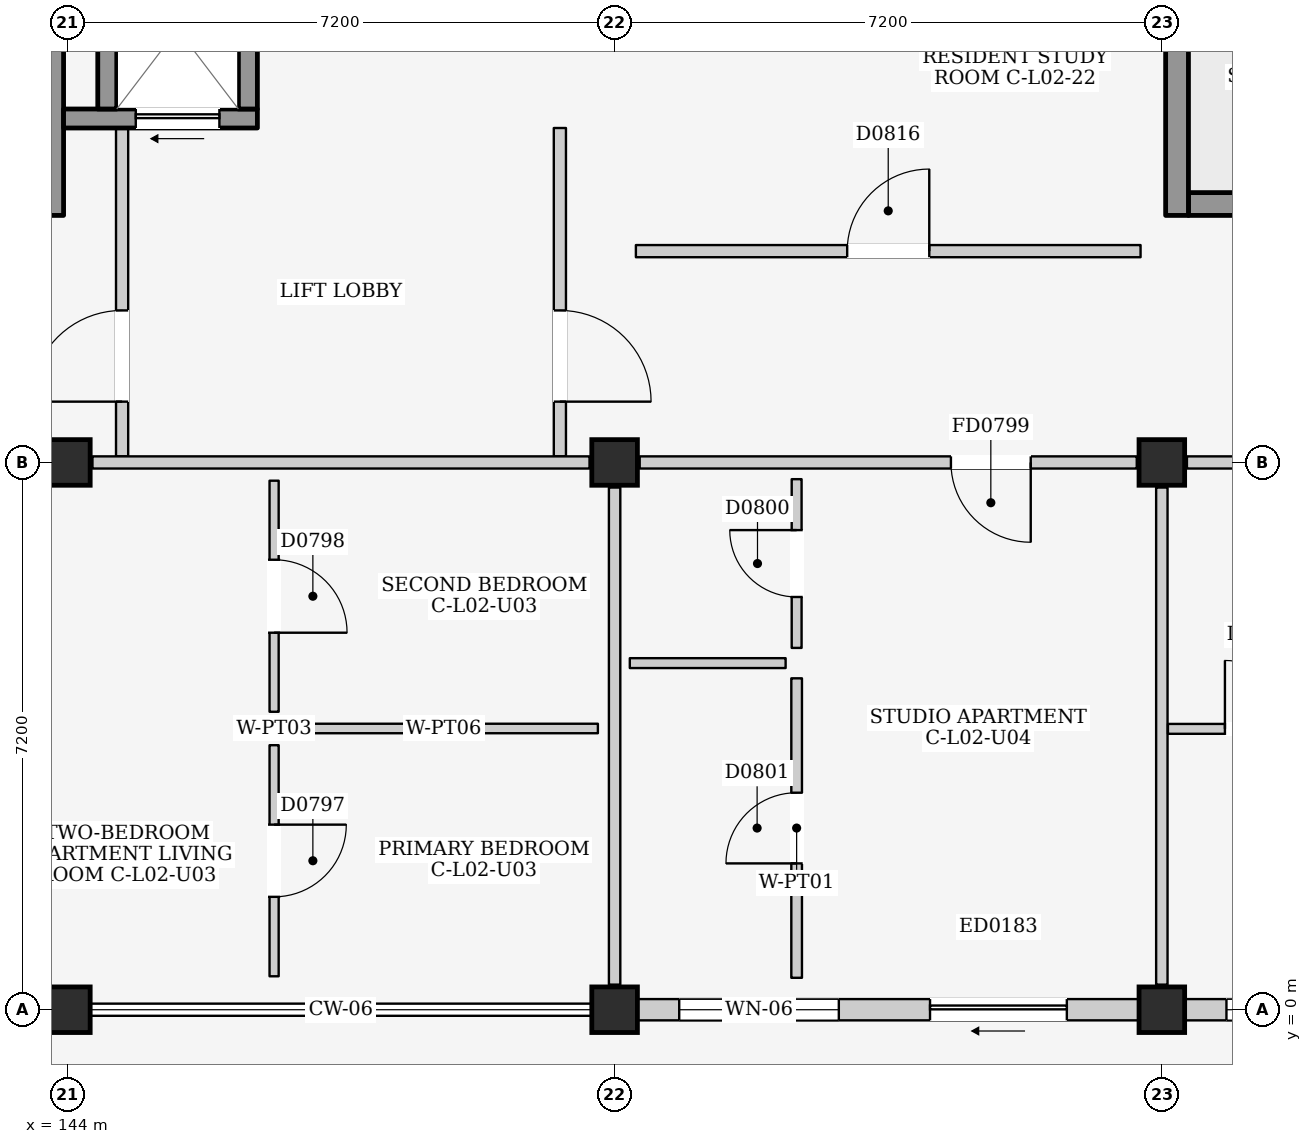
"""IFC4 building model, lengths in metres.
Left out: names, types, materials, properties, quantities, classifications, styles, units other than length and angle.
Written with IfcOpenShell. Run it as: python <this file> out.ifc"""

import sys

from ifc_helpers import new_model, si_unit, direction, frame, frame_2d, origin, origin_2d, place, context, subcontext, project, spatial, rectangle, extrude, element, fill, save


model = new_model("IFC4")
c1 = context("Model", 3, precision=1e-05, world=origin(), true_north=direction((0.0, 1.0)))
c2 = subcontext(c1, "Body", "Model", "MODEL_VIEW")
j1 = project(units=[si_unit("LENGTHUNIT", "METRE"), si_unit("PLANEANGLEUNIT", "RADIAN")], contexts=[c1])
p1 = place(None, origin())
s1 = spatial("IfcSite", under=j1, at=p1, CompositionType="ELEMENT")
p2 = place(p1, origin())
s2 = spatial("IfcBuilding", under=s1, at=p2, CompositionType="ELEMENT")
p3 = place(p2, frame((0.0, 0.0, 9.0)))
s3 = spatial("IfcBuildingStorey", under=s2, at=p3, CompositionType="ELEMENT", Elevation=9.0)
for number, where, z_axis, x_axis in (
    (1, (144.0, 0.0, 0.0), (0.0, 0.0, 1.0), (1.0, 0.0, 0.0)),
    (2, (144.0, 7.2, 0.0), (0.0, 0.0, 1.0), (1.0, 0.0, 0.0)),
    (3, (151.2, 0.0, 0.0), (0.0, 0.0, 1.0), (1.0, 0.0, 0.0)),
    (4, (151.2, 7.2, 0.0), (0.0, 0.0, 1.0), (1.0, 0.0, 0.0)),
    (5, (158.4, 0.0, 0.0), (0.0, 0.0, 1.0), (1.0, 0.0, 0.0)),
    (6, (158.4, 7.2, 0.0), (0.0, 0.0, 1.0), (1.0, 0.0, 0.0)),
):
    element("IfcColumn", number, at=place(p3, frame(where, z_axis=z_axis, x_axis=x_axis)), inside=s3, PredefinedType="COLUMN", context=c2, shape_type="SweptSolid", body=[
        extrude(rectangle(XDim=0.6, YDim=0.6, at=origin_2d()), origin(), (0.0, 0.0, 1.0), 3.2),
    ])
p4 = place(p3, frame((151.5, 0.0, 0.0), z_axis=(0.0, 0.0, 1.0), x_axis=(1.0, 0.0, 0.0)))
e7 = element("IfcWall", 7, at=p4, inside=s3, PredefinedType="ELEMENTEDWALL", context=c2, shape_type="SweptSolid", body=[
    extrude(rectangle(XDim=6.6, YDim=0.28, at=frame_2d((3.3, 0.0))), origin(), (0.0, 0.0, 1.0), 2.425),
])
p5 = place(p4, frame((3.85, 0.0, 0.0)))
e8 = element("IfcOpeningElement", 8, at=p5, cuts=e7, PredefinedType="OPENING", context=c2, shape_type="SweptSolid", body=[
    extrude(rectangle(XDim=1.8, YDim=2.12, at=frame_2d((0.9, 1.06))), frame((0.0, 0.155, 0.0), z_axis=(0.0, -1.0, 0.0), x_axis=(1.0, 0.0, 0.0)), (0.0, 0.0, 1.0), 0.31),
])
p6 = place(p4, frame((0.55, 0.0, 0.665)))
e9 = element("IfcOpeningElement", 9, at=p6, cuts=e7, PredefinedType="OPENING", context=c2, shape_type="SweptSolid", body=[
    extrude(rectangle(XDim=2.1, YDim=1.65, at=frame_2d((1.05, 0.825))), frame((0.0, 0.155, 0.0), z_axis=(0.0, -1.0, 0.0), x_axis=(1.0, 0.0, 0.0)), (0.0, 0.0, 1.0), 0.31),
])
p7 = place(p3, frame((158.7, 0.0, 0.0), z_axis=(0.0, 0.0, 1.0), x_axis=(1.0, 0.0, 0.0)))
e10 = element("IfcWall", 10, at=p7, inside=s3, PredefinedType="ELEMENTEDWALL", context=c2, shape_type="SweptSolid", body=[
    extrude(rectangle(XDim=6.6, YDim=0.28, at=frame_2d((3.3, 0.0))), origin(), (0.0, 0.0, 1.0), 2.425),
])
p8 = place(p7, frame((3.85, 0.0, 0.0)))
e11 = element("IfcOpeningElement", 11, at=p8, cuts=e10, PredefinedType="OPENING", context=c2, shape_type="SweptSolid", body=[
    extrude(rectangle(XDim=1.6, YDim=2.12, at=frame_2d((0.8, 1.06))), frame((0.0, 0.155, 0.0), z_axis=(0.0, -1.0, 0.0), x_axis=(1.0, 0.0, 0.0)), (0.0, 0.0, 1.0), 0.31),
])
p9 = place(p7, frame((0.55, 0.0, 0.9)))
e12 = element("IfcOpeningElement", 12, at=p9, cuts=e10, PredefinedType="OPENING", context=c2, shape_type="SweptSolid", body=[
    extrude(rectangle(XDim=1.4, YDim=1.2, at=frame_2d((0.7, 0.6))), frame((0.0, 0.155, 0.0), z_axis=(0.0, -1.0, 0.0), x_axis=(1.0, 0.0, 0.0)), (0.0, 0.0, 1.0), 0.31),
])
p10 = place(p3, frame((143.8, 10.45, 0.0), z_axis=(0.0, 0.0, 1.0), x_axis=(0.0, 1.0, 0.0)))
e13 = element("IfcWall", 13, at=p10, inside=s3, PredefinedType="SHEAR", context=c2, shape_type="SweptSolid", body=[
    extrude(rectangle(XDim=3.75, YDim=0.3, at=frame_2d((1.875, 0.0))), origin(), (0.0, 0.0, 1.0), 2.96),
])
p11 = place(p3, frame((144.72, 7.28, 0.0), z_axis=(0.0, 0.0, 1.0), x_axis=(0.0, 1.0, 0.0)))
e14 = element("IfcWall", 14, at=p11, inside=s3, PredefinedType="PARTITIONING", context=c2, shape_type="SweptSolid", body=[
    extrude(rectangle(XDim=4.32, YDim=0.16, at=frame_2d((2.16, 0.0))), origin(), (0.0, 0.0, 1.0), 2.96),
])
p12 = place(p11, frame((0.72, 0.0, 0.0)))
e15 = element("IfcOpeningElement", 15, at=p12, cuts=e14, PredefinedType="OPENING", context=c2, shape_type="SweptSolid", body=[
    extrude(rectangle(XDim=1.2, YDim=2.2, at=frame_2d((0.6, 1.1))), frame((0.0, 0.095, 0.0), z_axis=(0.0, -1.0, 0.0), x_axis=(1.0, 0.0, 0.0)), (0.0, 0.0, 1.0), 0.19),
])
p13 = place(p3, frame((150.48, 7.28, 0.0), z_axis=(0.0, 0.0, 1.0), x_axis=(0.0, 1.0, 0.0)))
e16 = element("IfcWall", 16, at=p13, inside=s3, PredefinedType="PARTITIONING", context=c2, shape_type="SweptSolid", body=[
    extrude(rectangle(XDim=4.32, YDim=0.16, at=frame_2d((2.16, 0.0))), origin(), (0.0, 0.0, 1.0), 2.96),
])
p14 = place(p13, frame((0.72, 0.0, 0.0)))
e17 = element("IfcOpeningElement", 17, at=p14, cuts=e16, PredefinedType="OPENING", context=c2, shape_type="SweptSolid", body=[
    extrude(rectangle(XDim=1.2, YDim=2.2, at=frame_2d((0.6, 1.1))), frame((0.0, 0.095, 0.0), z_axis=(0.0, -1.0, 0.0), x_axis=(1.0, 0.0, 0.0)), (0.0, 0.0, 1.0), 0.19),
])
p15 = place(p3, frame((143.95, 11.725, 0.0), z_axis=(0.0, 0.0, 1.0), x_axis=(1.0, 0.0, 0.0)))
e18 = element("IfcWall", 18, at=p15, inside=s3, PredefinedType="SHEAR", context=c2, shape_type="SweptSolid", body=[
    extrude(rectangle(XDim=2.55, YDim=0.25, at=frame_2d((1.275, 0.0))), origin(), (0.0, 0.0, 1.0), 2.96),
])
p16 = place(p15, frame((0.95, 0.0, 0.0)))
e19 = element("IfcOpeningElement", 19, at=p16, cuts=e18, PredefinedType="OPENING", context=c2, shape_type="SweptSolid", body=[
    extrude(rectangle(XDim=1.1, YDim=2.15, at=frame_2d((0.55, 1.075))), frame((0.0, 0.14, 0.0), z_axis=(0.0, -1.0, 0.0), x_axis=(1.0, 0.0, 0.0)), (0.0, 0.0, 1.0), 0.28),
])
for number, where, z_axis, x_axis in (
    (20, (144.525, 11.85, 0.0), (0.0, 0.0, 1.0), (0.0, 1.0, 0.0)),
    (21, (146.375, 11.85, 0.0), (0.0, 0.0, 1.0), (0.0, 1.0, 0.0)),
):
    element("IfcWall", number, at=place(p3, frame(where, z_axis=z_axis, x_axis=x_axis)), inside=s3, PredefinedType="SHEAR", context=c2, shape_type="SweptSolid", body=[
        extrude(rectangle(XDim=2.1, YDim=0.25, at=frame_2d((1.05, 0.0))), origin(), (0.0, 0.0, 1.0), 2.96),
    ])
p17 = place(p3, frame((158.75, 10.6, 0.0), z_axis=(0.0, 0.0, 1.0), x_axis=(1.0, 0.0, 0.0)))
e22 = element("IfcWall", 22, at=p17, inside=s3, PredefinedType="SHEAR", context=c2, shape_type="SweptSolid", body=[
    extrude(rectangle(XDim=6.5, YDim=0.3, at=frame_2d((3.25, 0.0))), origin(), (0.0, 0.0, 1.0), 2.96),
])
p18 = place(p17, frame((5.17, 0.0, 0.0)))
e23 = element("IfcOpeningElement", 23, at=p18, cuts=e22, PredefinedType="OPENING", context=c2, shape_type="SweptSolid", body=[
    extrude(rectangle(XDim=1.15, YDim=2.2, at=frame_2d((0.575, 1.1))), frame((0.0, 0.165, 0.0), z_axis=(0.0, -1.0, 0.0), x_axis=(1.0, 0.0, 0.0)), (0.0, 0.0, 1.0), 0.33),
])
p19 = place(p3, frame((158.6, 10.45, 0.0), z_axis=(0.0, 0.0, 1.0), x_axis=(0.0, 1.0, 0.0)))
e24 = element("IfcWall", 24, at=p19, inside=s3, PredefinedType="SHEAR", context=c2, shape_type="SweptSolid", body=[
    extrude(rectangle(XDim=3.6, YDim=0.3, at=frame_2d((1.8, 0.0))), origin(), (0.0, 0.0, 1.0), 2.96),
])
p20 = place(p3, frame((144.33, 7.2, 0.0), z_axis=(0.0, 0.0, 1.0), x_axis=(1.0, 0.0, 0.0)))
e25 = element("IfcWall", 25, at=p20, inside=s3, PredefinedType="PARTITIONING", context=c2, shape_type="SweptSolid", body=[
    extrude(rectangle(XDim=6.54, YDim=0.16, at=frame_2d((3.27, 0.0))), origin(), (0.0, 0.0, 1.0), 2.345),
])
p21 = place(p3, frame((151.2, 0.33, 0.0), z_axis=(0.0, 0.0, 1.0), x_axis=(0.0, 1.0, 0.0)))
e26 = element("IfcWall", 26, at=p21, inside=s3, PredefinedType="PARTITIONING", context=c2, shape_type="SweptSolid", body=[
    extrude(rectangle(XDim=6.54, YDim=0.15, at=frame_2d((3.27, 0.0))), origin(), (0.0, 0.0, 1.0), 2.395),
])
p22 = place(p3, frame((146.72, 0.44, 0.0), z_axis=(0.0, 0.0, 1.0), x_axis=(0.0, 1.0, 0.0)))
e27 = element("IfcWall", 27, at=p22, inside=s3, PredefinedType="PARTITIONING", context=c2, shape_type="SweptSolid", body=[
    extrude(rectangle(XDim=3.04, YDim=0.12, at=frame_2d((1.52, 0.0))), origin(), (0.0, 0.0, 1.0), 2.96),
])
p23 = place(p22, frame((1.045, 0.0, 0.0)))
e28 = element("IfcOpeningElement", 28, at=p23, cuts=e27, PredefinedType="OPENING", context=c2, shape_type="SweptSolid", body=[
    extrude(rectangle(XDim=0.95, YDim=2.15, at=frame_2d((0.475, 1.075))), frame((0.0, 0.075, 0.0), z_axis=(0.0, -1.0, 0.0), x_axis=(1.0, 0.0, 0.0)), (0.0, 0.0, 1.0), 0.15),
])
p24 = place(p3, frame((146.92, 3.7, 0.0), z_axis=(0.0, 0.0, 1.0), x_axis=(1.0, 0.0, 0.0)))
e29 = element("IfcWall", 29, at=p24, inside=s3, PredefinedType="PARTITIONING", context=c2, shape_type="SweptSolid", body=[
    extrude(rectangle(XDim=4.06, YDim=0.125, at=frame_2d((2.03, 0.0))), origin(), (0.0, 0.0, 1.0), 2.96),
])
p25 = place(p3, frame((146.72, 3.92, 0.0), z_axis=(0.0, 0.0, 1.0), x_axis=(0.0, 1.0, 0.0)))
e30 = element("IfcWall", 30, at=p25, inside=s3, PredefinedType="PARTITIONING", context=c2, shape_type="SweptSolid", body=[
    extrude(rectangle(XDim=3.04, YDim=0.12, at=frame_2d((1.52, 0.0))), origin(), (0.0, 0.0, 1.0), 2.96),
])
p26 = place(p25, frame((1.04, 0.0, 0.0)))
e31 = element("IfcOpeningElement", 31, at=p26, cuts=e30, PredefinedType="OPENING", context=c2, shape_type="SweptSolid", body=[
    extrude(rectangle(XDim=0.96, YDim=2.15, at=frame_2d((0.48, 1.075))), frame((0.0, 0.075, 0.0), z_axis=(0.0, -1.0, 0.0), x_axis=(1.0, 0.0, 0.0)), (0.0, 0.0, 1.0), 0.15),
])
p27 = place(p3, frame((151.53, 7.2, 0.0), z_axis=(0.0, 0.0, 1.0), x_axis=(1.0, 0.0, 0.0)))
e32 = element("IfcWall", 32, at=p27, inside=s3, PredefinedType="PARTITIONING", context=c2, shape_type="SweptSolid", body=[
    extrude(rectangle(XDim=6.54, YDim=0.16, at=frame_2d((3.27, 0.0))), origin(), (0.0, 0.0, 1.0), 2.345),
])
p28 = place(p27, frame((4.095, 0.0, 0.0)))
e33 = element("IfcOpeningElement", 33, at=p28, cuts=e32, PredefinedType="OPENING", context=c2, shape_type="SweptSolid", body=[
    extrude(rectangle(XDim=1.05, YDim=2.15, at=frame_2d((0.525, 1.075))), frame((0.0, 0.095, 0.0), z_axis=(0.0, -1.0, 0.0), x_axis=(1.0, 0.0, 0.0)), (0.0, 0.0, 1.0), 0.19),
])
p29 = place(p3, frame((158.4, 0.33, 0.0), z_axis=(0.0, 0.0, 1.0), x_axis=(0.0, 1.0, 0.0)))
e34 = element("IfcWall", 34, at=p29, inside=s3, PredefinedType="PARTITIONING", context=c2, shape_type="SweptSolid", body=[
    extrude(rectangle(XDim=6.54, YDim=0.15, at=frame_2d((3.27, 0.0))), origin(), (0.0, 0.0, 1.0), 2.395),
])
p30 = place(p3, frame((151.4, 4.56, 0.0), z_axis=(0.0, 0.0, 1.0), x_axis=(1.0, 0.0, 0.0)))
e35 = element("IfcWall", 35, at=p30, inside=s3, PredefinedType="PARTITIONING", context=c2, shape_type="SweptSolid", body=[
    extrude(rectangle(XDim=2.05, YDim=0.13, at=frame_2d((1.025, 0.0))), origin(), (0.0, 0.0, 1.0), 2.96),
])
p31 = place(p3, frame((153.595, 4.76, 0.0), z_axis=(0.0, 0.0, 1.0), x_axis=(0.0, 1.0, 0.0)))
e36 = element("IfcWall", 36, at=p31, inside=s3, PredefinedType="PARTITIONING", context=c2, shape_type="SweptSolid", body=[
    extrude(rectangle(XDim=2.22, YDim=0.13, at=frame_2d((1.11, 0.0))), origin(), (0.0, 0.0, 1.0), 2.96),
])
p32 = place(p31, frame((0.67, 0.0, 0.0)))
e37 = element("IfcOpeningElement", 37, at=p32, cuts=e36, PredefinedType="OPENING", context=c2, shape_type="SweptSolid", body=[
    extrude(rectangle(XDim=0.88, YDim=2.1, at=frame_2d((0.44, 1.05))), frame((0.0, 0.08, 0.0), z_axis=(0.0, -1.0, 0.0), x_axis=(1.0, 0.0, 0.0)), (0.0, 0.0, 1.0), 0.16),
])
p33 = place(p3, frame((153.595, 0.42, 0.0), z_axis=(0.0, 0.0, 1.0), x_axis=(0.0, 1.0, 0.0)))
e38 = element("IfcWall", 38, at=p33, inside=s3, PredefinedType="PARTITIONING", context=c2, shape_type="SweptSolid", body=[
    extrude(rectangle(XDim=3.94, YDim=0.14, at=frame_2d((1.97, 0.0))), origin(), (0.0, 0.0, 1.0), 2.96),
])
p34 = place(p33, frame((1.505, 0.0, 0.0)))
e39 = element("IfcOpeningElement", 39, at=p34, cuts=e38, PredefinedType="OPENING", context=c2, shape_type="SweptSolid", body=[
    extrude(rectangle(XDim=0.93, YDim=2.14, at=frame_2d((0.465, 1.07))), frame((0.0, 0.085, 0.0), z_axis=(0.0, -1.0, 0.0), x_axis=(1.0, 0.0, 0.0)), (0.0, 0.0, 1.0), 0.17),
])
p35 = place(p3, frame((158.73, 7.2, 0.0), z_axis=(0.0, 0.0, 1.0), x_axis=(1.0, 0.0, 0.0)))
e40 = element("IfcWall", 40, at=p35, inside=s3, PredefinedType="PARTITIONING", context=c2, shape_type="SweptSolid", body=[
    extrude(rectangle(XDim=6.54, YDim=0.16, at=frame_2d((3.27, 0.0))), origin(), (0.0, 0.0, 1.0), 2.345),
])
p36 = place(p35, frame((5.275, 0.0, 0.0)))
e41 = element("IfcOpeningElement", 41, at=p36, cuts=e40, PredefinedType="OPENING", context=c2, shape_type="SweptSolid", body=[
    extrude(rectangle(XDim=1.05, YDim=2.15, at=frame_2d((0.525, 1.075))), frame((0.0, 0.095, 0.0), z_axis=(0.0, -1.0, 0.0), x_axis=(1.0, 0.0, 0.0)), (0.0, 0.0, 1.0), 0.19),
])
p37 = place(p3, frame((158.48, 3.695, 0.0), z_axis=(0.0, 0.0, 1.0), x_axis=(1.0, 0.0, 0.0)))
e42 = element("IfcWall", 42, at=p37, inside=s3, PredefinedType="PARTITIONING", context=c2, shape_type="SweptSolid", body=[
    extrude(rectangle(XDim=2.4, YDim=0.13, at=frame_2d((1.2, 0.0))), origin(), (0.0, 0.0, 1.0), 2.96),
])
p38 = place(p37, frame((0.75, 0.0, 0.0)))
e43 = element("IfcOpeningElement", 43, at=p38, cuts=e42, PredefinedType="OPENING", context=c2, shape_type="SweptSolid", body=[
    extrude(rectangle(XDim=0.9, YDim=2.1, at=frame_2d((0.45, 1.05))), frame((0.0, 0.08, 0.0), z_axis=(0.0, -1.0, 0.0), x_axis=(1.0, 0.0, 0.0)), (0.0, 0.0, 1.0), 0.16),
])
p39 = place(p3, frame((151.48, 9.98, 0.0), z_axis=(0.0, 0.0, 1.0), x_axis=(1.0, 0.0, 0.0)))
e44 = element("IfcWall", 44, at=p39, inside=s3, PredefinedType="PARTITIONING", context=c2, shape_type="SweptSolid", body=[
    extrude(rectangle(XDim=6.64, YDim=0.16, at=frame_2d((3.32, 0.0))), origin(), (0.0, 0.0, 1.0), 2.96),
])
p40 = place(p39, frame((2.78, 0.0, 0.0)))
e45 = element("IfcOpeningElement", 45, at=p40, cuts=e44, PredefinedType="OPENING", context=c2, shape_type="SweptSolid", body=[
    extrude(rectangle(XDim=1.08, YDim=2.22, at=frame_2d((0.54, 1.11))), frame((0.0, 0.095, 0.0), z_axis=(0.0, -1.0, 0.0), x_axis=(1.0, 0.0, 0.0)), (0.0, 0.0, 1.0), 0.19),
])
p41 = place(p5, frame((1.8, 0.0, 0.0), z_axis=(0.0, 0.0, 1.0), x_axis=(-1.0, 0.0, 0.0)))
e46 = element("IfcDoor", 46, at=p41, inside=s3, OperationType="SLIDING_TO_LEFT", PredefinedType="DOOR", context=c2, shape_type="SweptSolid", body=[
    extrude(rectangle(XDim=1.8, YDim=2.12, at=frame_2d((0.9, 1.06))), frame((0.0, 0.025, 0.0), z_axis=(0.0, -1.0, 0.0), x_axis=(1.0, 0.0, 0.0)), (0.0, 0.0, 1.0), 0.05),
])
fill(e8, e46)
p42 = place(p6, origin())
e47 = element("IfcWindow", 47, at=p42, inside=s3, PartitioningType="DOUBLE_PANEL_VERTICAL", PredefinedType="WINDOW", context=c2, shape_type="SweptSolid", body=[
    extrude(rectangle(XDim=2.1, YDim=1.65, at=frame_2d((1.05, 0.825))), frame((0.0, 0.03, 0.0), z_axis=(0.0, -1.0, 0.0), x_axis=(1.0, 0.0, 0.0)), (0.0, 0.0, 1.0), 0.06),
])
fill(e9, e47)
p43 = place(p9, origin())
e48 = element("IfcWindow", 48, at=p43, inside=s3, PartitioningType="DOUBLE_PANEL_HORIZONTAL", PredefinedType="WINDOW", context=c2, shape_type="SweptSolid", body=[
    extrude(rectangle(XDim=1.4, YDim=1.2, at=frame_2d((0.7, 0.6))), frame((0.0, 0.03, 0.0), z_axis=(0.0, -1.0, 0.0), x_axis=(1.0, 0.0, 0.0)), (0.0, 0.0, 1.0), 0.06),
])
fill(e12, e48)
p44 = place(p12, origin())
e49 = element("IfcDoor", 49, at=p44, inside=s3, OperationType="SINGLE_SWING_LEFT", PredefinedType="DOOR", context=c2, shape_type="SweptSolid", body=[
    extrude(rectangle(XDim=1.2, YDim=2.2, at=frame_2d((0.6, 1.1))), frame((0.0, 0.025, 0.0), z_axis=(0.0, -1.0, 0.0), x_axis=(1.0, 0.0, 0.0)), (0.0, 0.0, 1.0), 0.05),
])
fill(e15, e49)
p45 = place(p14, frame((1.2, 0.0, 0.0), z_axis=(0.0, 0.0, 1.0), x_axis=(-1.0, 0.0, 0.0)))
e50 = element("IfcDoor", 50, at=p45, inside=s3, OperationType="SINGLE_SWING_RIGHT", PredefinedType="DOOR", context=c2, shape_type="SweptSolid", body=[
    extrude(rectangle(XDim=1.2, YDim=2.2, at=frame_2d((0.6, 1.1))), frame((0.0, 0.025, 0.0), z_axis=(0.0, -1.0, 0.0), x_axis=(1.0, 0.0, 0.0)), (0.0, 0.0, 1.0), 0.05),
])
fill(e17, e50)
p46 = place(p16, frame((1.1, 0.0, 0.0), z_axis=(0.0, 0.0, 1.0), x_axis=(-1.0, 0.0, 0.0)))
e51 = element("IfcDoor", 51, at=p46, inside=s3, OperationType="SLIDING_TO_LEFT", PredefinedType="DOOR", context=c2, shape_type="SweptSolid", body=[
    extrude(rectangle(XDim=1.1, YDim=2.15, at=frame_2d((0.55, 1.075))), frame((0.0, 0.025, 0.0), z_axis=(0.0, -1.0, 0.0), x_axis=(1.0, 0.0, 0.0)), (0.0, 0.0, 1.0), 0.05),
])
fill(e19, e51)
p47 = place(p23, frame((0.95, 0.0, 0.0), z_axis=(0.0, 0.0, 1.0), x_axis=(-1.0, 0.0, 0.0)))
e52 = element("IfcDoor", 52, at=p47, inside=s3, OperationType="SINGLE_SWING_LEFT", PredefinedType="DOOR", context=c2, shape_type="SweptSolid", body=[
    extrude(rectangle(XDim=0.95, YDim=2.15, at=frame_2d((0.475, 1.075))), frame((0.0, 0.025, 0.0), z_axis=(0.0, -1.0, 0.0), x_axis=(1.0, 0.0, 0.0)), (0.0, 0.0, 1.0), 0.05),
])
fill(e28, e52)
p48 = place(p26, frame((0.96, 0.0, 0.0), z_axis=(0.0, 0.0, 1.0), x_axis=(-1.0, 0.0, 0.0)))
e53 = element("IfcDoor", 53, at=p48, inside=s3, OperationType="SINGLE_SWING_RIGHT", PredefinedType="DOOR", context=c2, shape_type="SweptSolid", body=[
    extrude(rectangle(XDim=0.96, YDim=2.15, at=frame_2d((0.48, 1.075))), frame((0.0, 0.025, 0.0), z_axis=(0.0, -1.0, 0.0), x_axis=(1.0, 0.0, 0.0)), (0.0, 0.0, 1.0), 0.05),
])
fill(e31, e53)
p49 = place(p28, frame((1.05, 0.0, 0.0), z_axis=(0.0, 0.0, 1.0), x_axis=(-1.0, 0.0, 0.0)))
e54 = element("IfcDoor", 54, at=p49, inside=s3, OperationType="SINGLE_SWING_LEFT", PredefinedType="DOOR", context=c2, shape_type="SweptSolid", body=[
    extrude(rectangle(XDim=1.05, YDim=2.15, at=frame_2d((0.525, 1.075))), frame((0.0, 0.025, 0.0), z_axis=(0.0, -1.0, 0.0), x_axis=(1.0, 0.0, 0.0)), (0.0, 0.0, 1.0), 0.05),
])
fill(e33, e54)
p50 = place(p32, origin())
e55 = element("IfcDoor", 55, at=p50, inside=s3, OperationType="SINGLE_SWING_RIGHT", PredefinedType="DOOR", context=c2, shape_type="SweptSolid", body=[
    extrude(rectangle(XDim=0.88, YDim=2.1, at=frame_2d((0.44, 1.05))), frame((0.0, 0.025, 0.0), z_axis=(0.0, -1.0, 0.0), x_axis=(1.0, 0.0, 0.0)), (0.0, 0.0, 1.0), 0.05),
])
fill(e37, e55)
p51 = place(p34, origin())
e56 = element("IfcDoor", 56, at=p51, inside=s3, OperationType="SINGLE_SWING_LEFT", PredefinedType="DOOR", context=c2, shape_type="SweptSolid", body=[
    extrude(rectangle(XDim=0.93, YDim=2.14, at=frame_2d((0.465, 1.07))), frame((0.0, 0.025, 0.0), z_axis=(0.0, -1.0, 0.0), x_axis=(1.0, 0.0, 0.0)), (0.0, 0.0, 1.0), 0.05),
])
fill(e39, e56)
p52 = place(p38, origin())
e57 = element("IfcDoor", 57, at=p52, inside=s3, OperationType="SINGLE_SWING_LEFT", PredefinedType="DOOR", context=c2, shape_type="SweptSolid", body=[
    extrude(rectangle(XDim=0.9, YDim=2.1, at=frame_2d((0.45, 1.05))), frame((0.0, 0.025, 0.0), z_axis=(0.0, -1.0, 0.0), x_axis=(1.0, 0.0, 0.0)), (0.0, 0.0, 1.0), 0.05),
])
fill(e43, e57)
p53 = place(p40, origin())
e58 = element("IfcDoor", 58, at=p53, inside=s3, OperationType="SINGLE_SWING_RIGHT", PredefinedType="DOOR", context=c2, shape_type="SweptSolid", body=[
    extrude(rectangle(XDim=1.08, YDim=2.22, at=frame_2d((0.54, 1.11))), frame((0.0, 0.025, 0.0), z_axis=(0.0, -1.0, 0.0), x_axis=(1.0, 0.0, 0.0)), (0.0, 0.0, 1.0), 0.05),
])
fill(e45, e58)
save(model, sys.argv[1])
